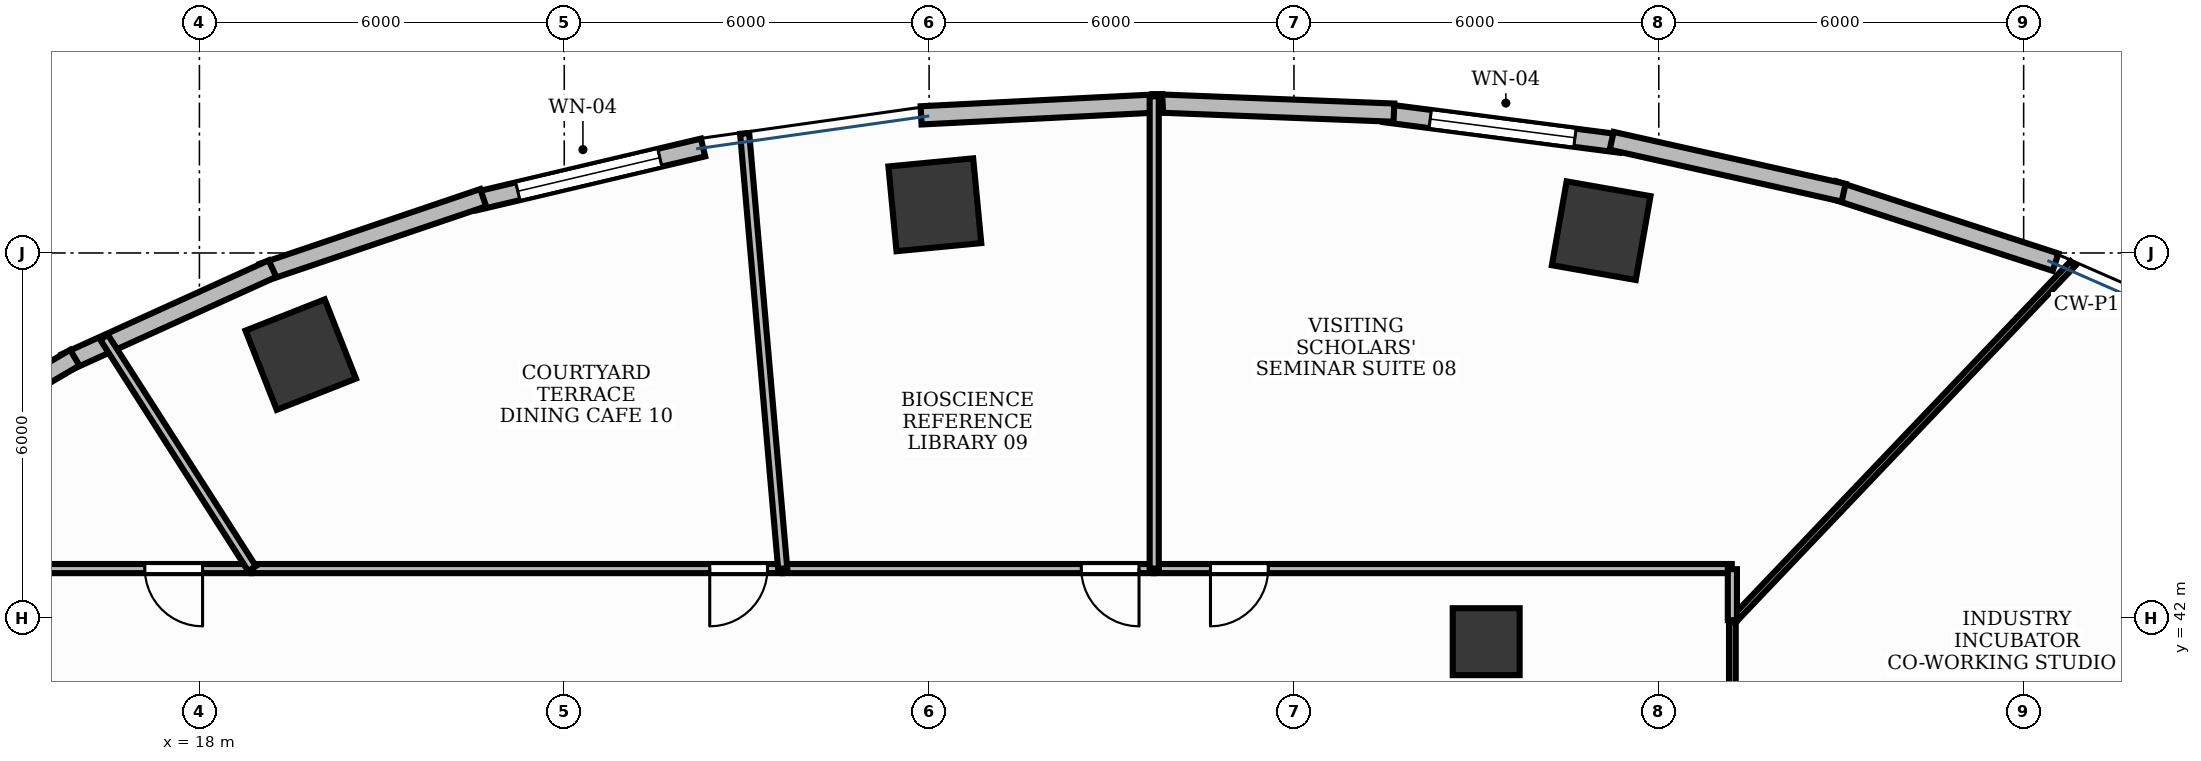
"""IFC4 building model, lengths in metres.
Left out: names, types, materials, properties, quantities, classifications, styles, units other than length and angle.
Written with IfcOpenShell. Run it as: python <this file> out.ifc"""

import sys

from ifc_helpers import new_model, si_unit, direction, frame, frame_2d, origin, origin_2d, place, context, subcontext, project, spatial, rectangle, extrude, element, fill, save


model = new_model("IFC4")
c1 = context("Model", 3, precision=1e-05, world=origin(), true_north=direction((0.0, 1.0)))
c2 = subcontext(c1, "Body", "Model", "MODEL_VIEW")
j1 = project(units=[si_unit("LENGTHUNIT", "METRE"), si_unit("PLANEANGLEUNIT", "RADIAN")], contexts=[c1])
p1 = place(None, origin())
s1 = spatial("IfcSite", under=j1, at=p1, CompositionType="ELEMENT")
p2 = place(p1, origin())
s2 = spatial("IfcBuilding", under=s1, at=p2, CompositionType="ELEMENT")
p3 = place(p2, frame((0.0, 0.0, 20.4)))
s3 = spatial("IfcBuildingStorey", under=s2, at=p3, CompositionType="ELEMENT", Elevation=20.4)
p4 = place(p3, frame((41.052, 48.367, -0.0), z_axis=(0.0, 0.0, 1.0), x_axis=(-0.984868307662, 0.173304404339, 0.0)))
e1 = element("IfcColumn", 1, at=p4, inside=s3, PredefinedType="COLUMN", context=c2, shape_type="SweptSolid", body=[
    extrude(rectangle(XDim=1.4, YDim=1.4, at=origin_2d()), origin(), (0.0, 0.0, 1.0), 5.101),
])
p5 = place(p3, frame((39.161, 41.608, -0.0), z_axis=(0.0, 0.0, 1.0), x_axis=(1.0, 0.0, 0.0)))
e2 = element("IfcColumn", 2, at=p5, inside=s3, PredefinedType="COLUMN", context=c2, shape_type="SweptSolid", body=[
    extrude(rectangle(XDim=1.1, YDim=1.1, at=origin_2d()), origin(), (0.0, 0.0, 1.0), 5.101),
])
for number, where, z_axis, x_axis in (
    (3, (30.094, 48.792, -0.0), (0.0, 0.0, 1.0), (0.995, 0.095, 0.0)),
    (4, (19.667, 46.329, -0.0), (0.0, 0.0, 1.0), (0.93, 0.367, 0.0)),
):
    element("IfcColumn", number, at=place(p3, frame(where, z_axis=z_axis, x_axis=x_axis)), inside=s3, PredefinedType="COLUMN", context=c2, shape_type="SweptSolid", body=[
        extrude(rectangle(XDim=1.4, YDim=1.4, at=origin_2d()), origin(), (0.0, 0.0, 1.0), 5.101),
    ])
p6 = place(p3, frame((41.373, 49.798, 0.0), z_axis=(0.0, 0.0, 1.0), x_axis=(-0.991741322416, 0.128254237408, 0.0)))
e5 = element("IfcWall", 5, at=p6, inside=s3, PredefinedType="STANDARD", context=c2, shape_type="SweptSolid", body=[
    extrude(rectangle(XDim=3.916, YDim=0.3, at=frame_2d((1.958, 0.0))), origin(), (0.0, 0.0, 1.0), 4.67),
])
p7 = place(p6, frame((0.758, 0.0, 1.5)))
e6 = element("IfcOpeningElement", 6, at=p7, cuts=e5, PredefinedType="OPENING", context=c2, shape_type="SweptSolid", body=[
    extrude(rectangle(XDim=2.4, YDim=1.2, at=frame_2d((1.2, 0.6))), frame((0.0, 0.165, 0.0), z_axis=(0.0, -1.0, 0.0), x_axis=(1.0, 0.0, 0.0)), (0.0, 0.0, 1.0), 0.33),
])
p8 = place(p3, frame((26.282, 49.735, 0.0), z_axis=(0.0, 0.0, 1.0), x_axis=(-0.973186156802, -0.230018921417, 0.0)))
e7 = element("IfcWall", 7, at=p8, inside=s3, PredefinedType="STANDARD", context=c2, shape_type="SweptSolid", body=[
    extrude(rectangle(XDim=3.861, YDim=0.3, at=frame_2d((1.931, 0.0))), origin(), (0.0, 0.0, 1.0), 5.1),
])
p9 = place(p8, frame((0.731, 0.0, 1.5)))
e8 = element("IfcOpeningElement", 8, at=p9, cuts=e7, PredefinedType="OPENING", context=c2, shape_type="SweptSolid", body=[
    extrude(rectangle(XDim=2.4, YDim=1.2, at=frame_2d((1.2, 0.6))), frame((0.0, 0.165, 0.0), z_axis=(0.0, -1.0, 0.0), x_axis=(1.0, 0.0, 0.0)), (0.0, 0.0, 1.0), 0.33),
])
p10 = place(p3, frame((48.525, 47.849, 0.0), z_axis=(0.0, 0.0, 1.0), x_axis=(-0.950965833732, 0.309295947393, 0.0)))
e9 = element("IfcWall", 9, at=p10, inside=s3, PredefinedType="STANDARD", context=c2, shape_type="SweptSolid", body=[
    extrude(rectangle(XDim=3.84, YDim=0.3, at=frame_2d((1.92, 0.0))), origin(), (0.0, 0.0, 1.0), 5.1),
])
p11 = place(p3, frame((45.04, 48.991, 0.0), z_axis=(0.0, 0.0, 1.0), x_axis=(-0.975868573345, 0.218358713032, 0.0)))
e10 = element("IfcWall", 10, at=p11, inside=s3, PredefinedType="STANDARD", context=c2, shape_type="SweptSolid", body=[
    extrude(rectangle(XDim=3.909, YDim=0.3, at=frame_2d((1.954, 0.0))), origin(), (0.0, 0.0, 1.0), 5.1),
])
p12 = place(p3, frame((37.644, 50.308, 0.0), z_axis=(0.0, 0.0, 1.0), x_axis=(-0.999245411623, 0.038840794937, 0.0)))
e11 = element("IfcWall", 11, at=p12, inside=s3, PredefinedType="STANDARD", context=c2, shape_type="SweptSolid", body=[
    extrude(rectangle(XDim=3.979, YDim=0.3, at=frame_2d((1.989, 0.0))), origin(), (0.0, 0.0, 1.0), 5.1),
])
p13 = place(p3, frame((33.84, 50.463, 0.0), z_axis=(0.0, 0.0, 1.0), x_axis=(-0.998732359232, -0.050335619826, 0.0)))
e12 = element("IfcWall", 12, at=p13, inside=s3, PredefinedType="STANDARD", context=c2, shape_type="SweptSolid", body=[
    extrude(rectangle(XDim=3.977, YDim=0.3, at=frame_2d((1.989, 0.0))), origin(), (0.0, 0.0, 1.0), 4.67),
])
p14 = place(p3, frame((22.667, 48.909, 0.0), z_axis=(0.0, 0.0, 1.0), x_axis=(-0.94702579403, -0.321157508773, 0.0)))
e13 = element("IfcWall", 13, at=p14, inside=s3, PredefinedType="STANDARD", context=c2, shape_type="SweptSolid", body=[
    extrude(rectangle(XDim=3.83, YDim=0.3, at=frame_2d((1.915, 0.0))), origin(), (0.0, 0.0, 1.0), 5.1),
])
p15 = place(p3, frame((19.201, 47.743, 0.0), z_axis=(0.0, 0.0, 1.0), x_axis=(-0.910623406862, -0.413237233166, 0.0)))
e14 = element("IfcWall", 14, at=p15, inside=s3, PredefinedType="STANDARD", context=c2, shape_type="SweptSolid", body=[
    extrude(rectangle(XDim=3.74, YDim=0.3, at=frame_2d((1.87, 0.0))), origin(), (0.0, 0.0, 1.0), 5.1),
])
p16 = place(p3, frame((15.951, 46.278, 0.0), z_axis=(0.0, 0.0, 1.0), x_axis=(-0.8624654944, -0.506115867139, 0.0)))
e15 = element("IfcWall", 15, at=p16, inside=s3, PredefinedType="STANDARD", context=c2, shape_type="SweptSolid", body=[
    extrude(rectangle(XDim=3.635, YDim=0.3, at=frame_2d((1.818, 0.0))), origin(), (0.0, 0.0, 1.0), 5.1),
])
p17 = place(p3, frame((43.21, 30.852, 0.0), z_axis=(0.0, 0.0, 1.0), x_axis=(0.0, 1.0, 0.0)))
e16 = element("IfcWall", 16, at=p17, inside=s3, PredefinedType="MOVABLE", context=c2, shape_type="SweptSolid", body=[
    extrude(rectangle(XDim=11.095, YDim=0.11, at=frame_2d((5.547, 0.0))), origin(), (0.0, 0.0, 1.0), 4.11),
])
p18 = place(p17, frame((0.24, 0.0, 0.0)))
e17 = element("IfcOpeningElement", 17, at=p18, cuts=e16, PredefinedType="OPENING", context=c2, shape_type="SweptSolid", body=[
    extrude(rectangle(XDim=0.95, YDim=2.15, at=frame_2d((0.475, 1.075))), frame((0.0, 0.07, 0.0), z_axis=(0.0, -1.0, 0.0), x_axis=(1.0, 0.0, 0.0)), (0.0, 0.0, 1.0), 0.14),
])
p19 = place(p3, frame((43.2, 42.81, 0.0), z_axis=(0.0, 0.0, 1.0), x_axis=(-1.0, 0.0, 0.0)))
e18 = element("IfcWall", 18, at=p19, inside=s3, PredefinedType="PARTITIONING", context=c2, shape_type="SweptSolid", body=[
    extrude(rectangle(XDim=9.498, YDim=0.15, at=frame_2d((4.749, 0.0))), origin(), (0.0, 0.0, 1.0), 4.11),
])
p20 = place(p19, frame((7.623, 0.0, 0.0)))
e19 = element("IfcOpeningElement", 19, at=p20, cuts=e18, PredefinedType="OPENING", context=c2, shape_type="SweptSolid", body=[
    extrude(rectangle(XDim=0.95, YDim=2.15, at=frame_2d((0.475, 1.075))), frame((0.0, 0.09, 0.0), z_axis=(0.0, -1.0, 0.0), x_axis=(1.0, 0.0, 0.0)), (0.0, 0.0, 1.0), 0.18),
])
p21 = place(p3, frame((33.692, 42.81, 0.0), z_axis=(0.0, 0.0, 1.0), x_axis=(-1.0, 0.0, 0.0)))
e20 = element("IfcWall", 20, at=p21, inside=s3, PredefinedType="PARTITIONING", context=c2, shape_type="SweptSolid", body=[
    extrude(rectangle(XDim=6.1, YDim=0.15, at=frame_2d((3.05, 0.0))), origin(), (0.0, 0.0, 1.0), 4.11),
])
p22 = place(p21, frame((0.24, 0.0, 0.0)))
e21 = element("IfcOpeningElement", 21, at=p22, cuts=e20, PredefinedType="OPENING", context=c2, shape_type="SweptSolid", body=[
    extrude(rectangle(XDim=0.95, YDim=2.15, at=frame_2d((0.475, 1.075))), frame((0.0, 0.09, 0.0), z_axis=(0.0, -1.0, 0.0), x_axis=(1.0, 0.0, 0.0)), (0.0, 0.0, 1.0), 0.18),
])
p23 = place(p3, frame((27.583, 42.81, 0.0), z_axis=(0.0, 0.0, 1.0), x_axis=(-1.0, 0.0, 0.0)))
e22 = element("IfcWall", 22, at=p23, inside=s3, PredefinedType="PARTITIONING", context=c2, shape_type="SweptSolid", body=[
    extrude(rectangle(XDim=8.718, YDim=0.15, at=frame_2d((4.359, 0.0))), origin(), (0.0, 0.0, 1.0), 4.11),
])
p24 = place(p23, frame((0.24, 0.0, 0.0)))
e23 = element("IfcOpeningElement", 23, at=p24, cuts=e22, PredefinedType="OPENING", context=c2, shape_type="SweptSolid", body=[
    extrude(rectangle(XDim=0.95, YDim=2.15, at=frame_2d((0.475, 1.075))), frame((0.0, 0.09, 0.0), z_axis=(0.0, -1.0, 0.0), x_axis=(1.0, 0.0, 0.0)), (0.0, 0.0, 1.0), 0.18),
])
p25 = place(p3, frame((18.853, 42.81, 0.0), z_axis=(0.0, 0.0, 1.0), x_axis=(-1.0, 0.0, 0.0)))
e24 = element("IfcWall", 24, at=p25, inside=s3, PredefinedType="PARTITIONING", context=c2, shape_type="SweptSolid", body=[
    extrude(rectangle(XDim=4.353, YDim=0.15, at=frame_2d((2.177, 0.0))), origin(), (0.0, 0.0, 1.0), 4.11),
])
p26 = place(p25, frame((0.801, 0.0, 0.0)))
e25 = element("IfcOpeningElement", 25, at=p26, cuts=e24, PredefinedType="OPENING", context=c2, shape_type="SweptSolid", body=[
    extrude(rectangle(XDim=0.95, YDim=2.15, at=frame_2d((0.475, 1.075))), frame((0.0, 0.09, 0.0), z_axis=(0.0, -1.0, 0.0), x_axis=(1.0, 0.0, 0.0)), (0.0, 0.0, 1.0), 0.18),
])
p27 = place(p3, frame((43.21, 41.947, 0.0), z_axis=(0.0, 0.0, 1.0), x_axis=(0.689609379857, 0.724181540232, 0.0)))
e26 = element("IfcWall", 26, at=p27, inside=s3, PredefinedType="MOVABLE", context=c2, shape_type="SweptSolid", body=[
    extrude(rectangle(XDim=8.121, YDim=0.11, at=frame_2d((4.061, 0.0))), origin(), (0.0, 0.0, 1.0), 4.11),
])
p28 = place(p3, frame((43.21, 41.961, 0.0), z_axis=(0.0, 0.0, 1.0), x_axis=(0.0, 1.0, 0.0)))
e27 = element("IfcWall", 27, at=p28, inside=s3, PredefinedType="PARTITIONING", context=c2, shape_type="SweptSolid", body=[
    extrude(rectangle(XDim=0.839, YDim=0.15, at=frame_2d((0.419, 0.0))), origin(), (0.0, 0.0, 1.0), 4.11),
])
p29 = place(p3, frame((33.702, 42.81, 0.0), z_axis=(0.0, 0.0, 1.0), x_axis=(0.0, 1.0, 0.0)))
e28 = element("IfcWall", 28, at=p29, inside=s3, PredefinedType="PARTITIONING", context=c2, shape_type="SweptSolid", body=[
    extrude(rectangle(XDim=7.766, YDim=0.15, at=frame_2d((3.883, 0.0))), origin(), (0.0, 0.0, 1.0), 4.11),
])
p30 = place(p3, frame((27.592, 42.81, 0.0), z_axis=(0.0, 0.0, 1.0), x_axis=(-0.087139968074, 0.996196078071, 0.0)))
e29 = element("IfcWall", 29, at=p30, inside=s3, PredefinedType="PARTITIONING", context=c2, shape_type="SweptSolid", body=[
    extrude(rectangle(XDim=7.184, YDim=0.15, at=frame_2d((3.592, 0.0))), origin(), (0.0, 0.0, 1.0), 4.11),
])
p31 = place(p3, frame((18.865, 42.81, 0.0), z_axis=(0.0, 0.0, 1.0), x_axis=(-0.538769890466, 0.842452969089, 0.0)))
e30 = element("IfcWall", 30, at=p31, inside=s3, PredefinedType="PARTITIONING", context=c2, shape_type="SweptSolid", body=[
    extrude(rectangle(XDim=4.517, YDim=0.15, at=frame_2d((2.258, 0.0))), origin(), (0.0, 0.0, 1.0), 4.11),
])
p32 = place(p7, origin())
e31 = element("IfcWindow", 31, at=p32, inside=s3, PartitioningType="DOUBLE_PANEL_HORIZONTAL", PredefinedType="WINDOW", context=c2, shape_type="SweptSolid", body=[
    extrude(rectangle(XDim=2.4, YDim=1.2, at=frame_2d((1.2, 0.6))), frame((0.0, 0.03, 0.0), z_axis=(0.0, -1.0, 0.0), x_axis=(1.0, 0.0, 0.0)), (0.0, 0.0, 1.0), 0.06),
])
fill(e6, e31)
p33 = place(p9, origin())
e32 = element("IfcWindow", 32, at=p33, inside=s3, PartitioningType="DOUBLE_PANEL_HORIZONTAL", PredefinedType="WINDOW", context=c2, shape_type="SweptSolid", body=[
    extrude(rectangle(XDim=2.4, YDim=1.2, at=frame_2d((1.2, 0.6))), frame((0.0, 0.03, 0.0), z_axis=(0.0, -1.0, 0.0), x_axis=(1.0, 0.0, 0.0)), (0.0, 0.0, 1.0), 0.06),
])
fill(e8, e32)
p34 = place(p20, origin())
e33 = element("IfcDoor", 33, at=p34, inside=s3, OperationType="SINGLE_SWING_RIGHT", PredefinedType="DOOR", context=c2, shape_type="SweptSolid", body=[
    extrude(rectangle(XDim=0.95, YDim=2.15, at=frame_2d((0.475, 1.075))), frame((0.0, 0.025, 0.0), z_axis=(0.0, -1.0, 0.0), x_axis=(1.0, 0.0, 0.0)), (0.0, 0.0, 1.0), 0.05),
])
fill(e19, e33)
p35 = place(p22, origin())
e34 = element("IfcDoor", 34, at=p35, inside=s3, OperationType="SINGLE_SWING_LEFT", PredefinedType="DOOR", context=c2, shape_type="SweptSolid", body=[
    extrude(rectangle(XDim=0.95, YDim=2.15, at=frame_2d((0.475, 1.075))), frame((0.0, 0.025, 0.0), z_axis=(0.0, -1.0, 0.0), x_axis=(1.0, 0.0, 0.0)), (0.0, 0.0, 1.0), 0.05),
])
fill(e21, e34)
p36 = place(p24, origin())
e35 = element("IfcDoor", 35, at=p36, inside=s3, OperationType="SINGLE_SWING_RIGHT", PredefinedType="DOOR", context=c2, shape_type="SweptSolid", body=[
    extrude(rectangle(XDim=0.95, YDim=2.15, at=frame_2d((0.475, 1.075))), frame((0.0, 0.025, 0.0), z_axis=(0.0, -1.0, 0.0), x_axis=(1.0, 0.0, 0.0)), (0.0, 0.0, 1.0), 0.05),
])
fill(e23, e35)
p37 = place(p26, origin())
e36 = element("IfcDoor", 36, at=p37, inside=s3, OperationType="SINGLE_SWING_LEFT", PredefinedType="DOOR", context=c2, shape_type="SweptSolid", body=[
    extrude(rectangle(XDim=0.95, YDim=2.15, at=frame_2d((0.475, 1.075))), frame((0.0, 0.025, 0.0), z_axis=(0.0, -1.0, 0.0), x_axis=(1.0, 0.0, 0.0)), (0.0, 0.0, 1.0), 0.05),
])
fill(e25, e36)
save(model, sys.argv[1])
